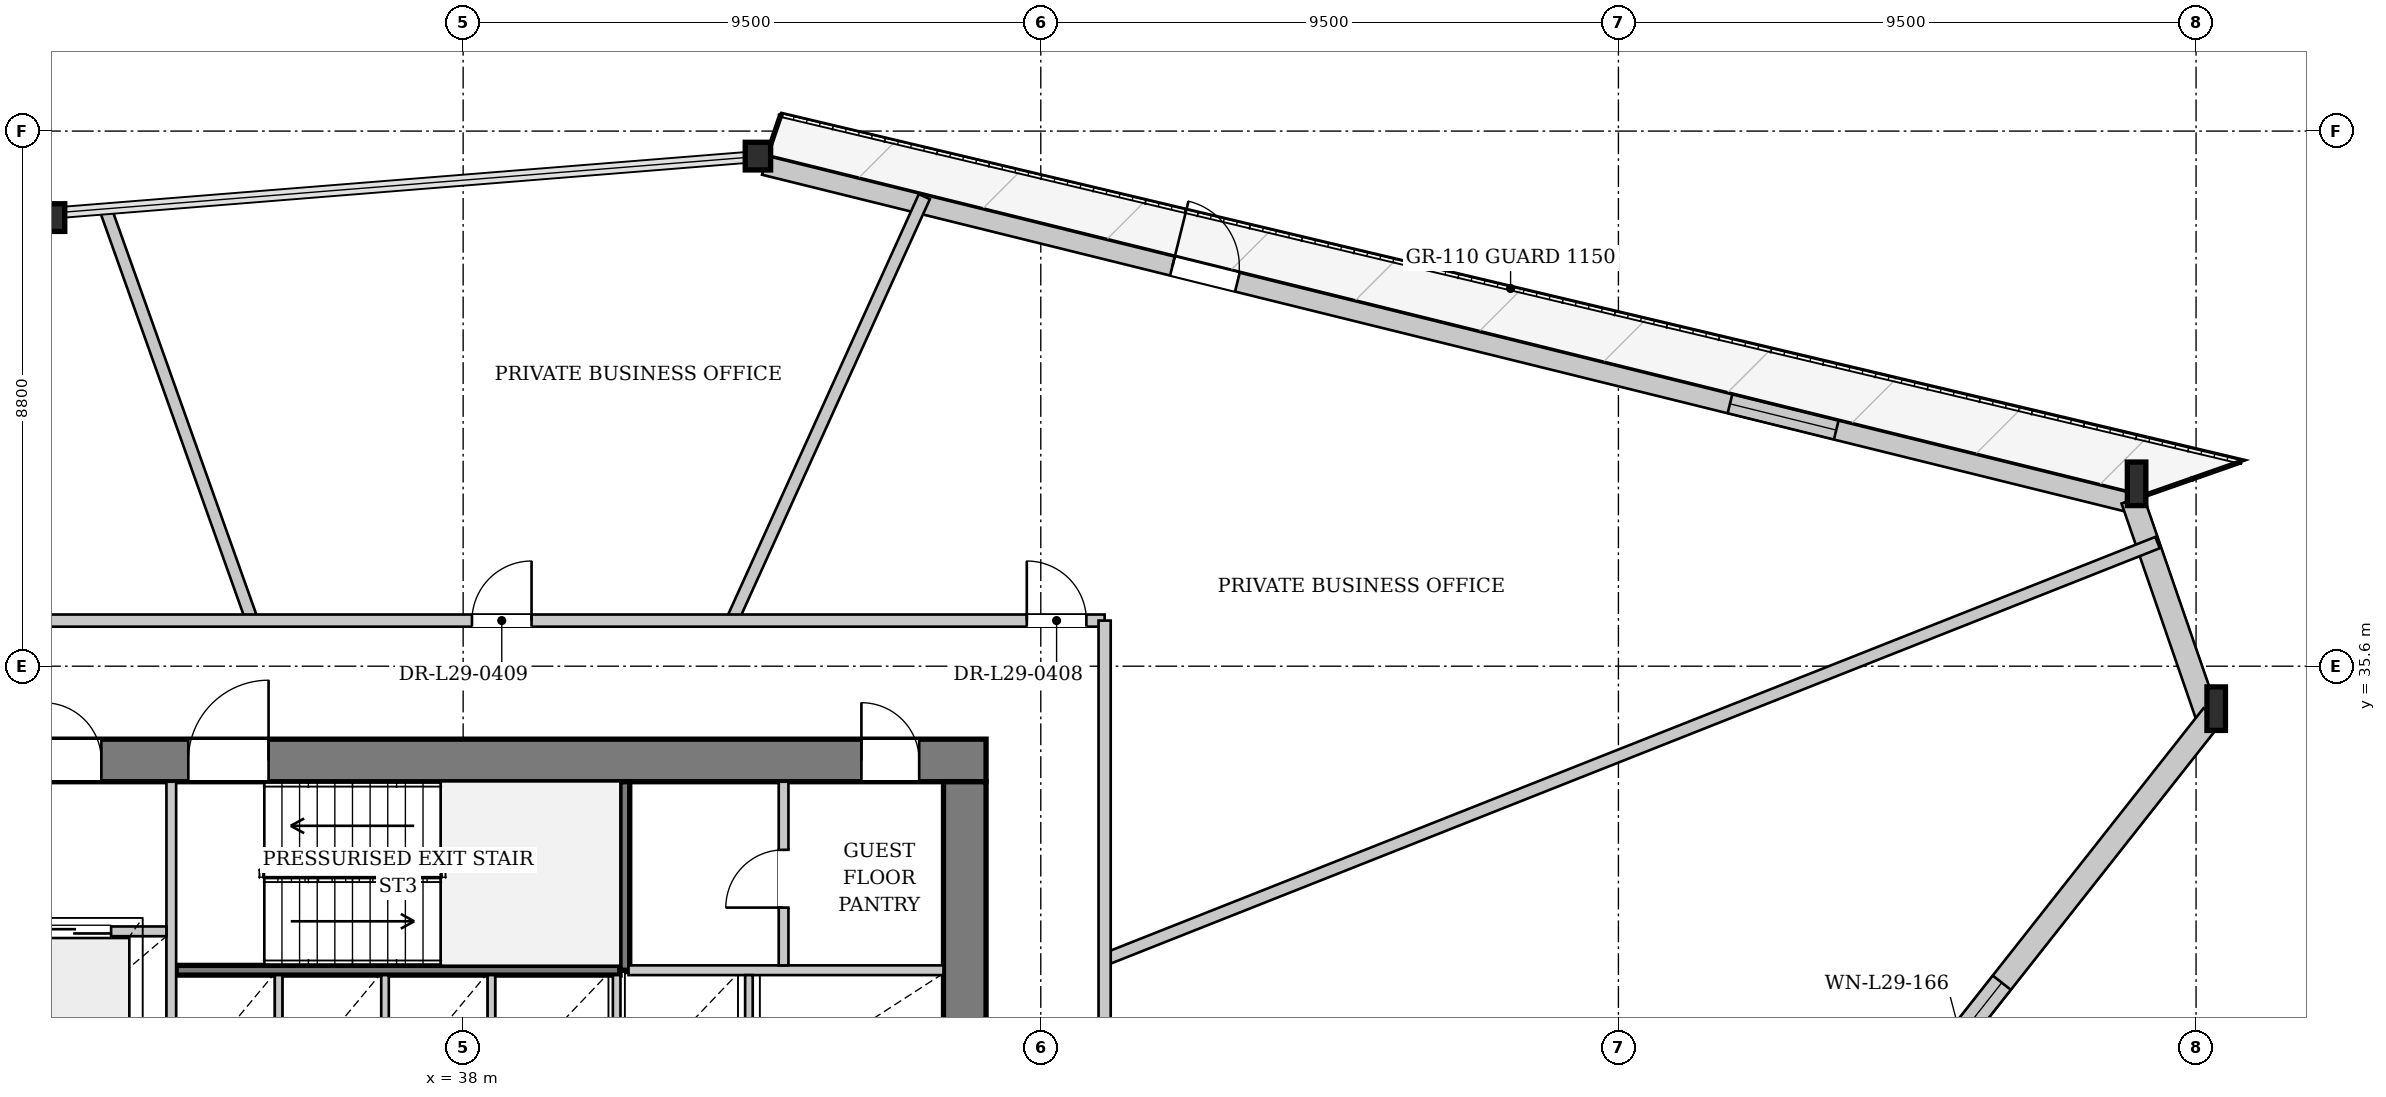
"""IFC4 building model, lengths in metres.
Left out: names, types, materials, properties, quantities, classifications, styles, units other than length and angle.
Written with IfcOpenShell. Run it as: python <this file> out.ifc"""

import sys

from ifc_helpers import new_model, si_unit, direction, frame, frame_2d, origin, origin_2d, place, context, subcontext, project, spatial, rectangle, i_section, extrude, source, transform, mapped, element, fill, save


model = new_model("IFC4")
c1 = context("Model", 3, precision=1e-05, world=origin(), true_north=direction((0.0, 1.0)))
c2 = subcontext(c1, "Body", "Model", "MODEL_VIEW")
j1 = project(units=[si_unit("LENGTHUNIT", "METRE"), si_unit("PLANEANGLEUNIT", "RADIAN")], contexts=[c1])
p1 = place(None, origin())
s1 = spatial("IfcSite", under=j1, at=p1, CompositionType="ELEMENT")
p2 = place(p1, origin())
s2 = spatial("IfcBuilding", under=s1, at=p2, CompositionType="ELEMENT")
p3 = place(p2, frame((0.0, 0.0, 112.8)))
s3 = spatial("IfcBuildingStorey", under=s2, at=p3, CompositionType="ELEMENT", Elevation=112.8)
m1 = source(origin(), c2, "Body", "SweptSolid", [
    extrude(i_section(OverallWidth=0.304, OverallDepth=0.716, WebThickness=0.021, FlangeThickness=0.04, at=origin_2d()), origin(), (0.0, 0.0, 1.0), 3.42),
])
p4 = place(p3, frame((66.92, 34.674, 0.0), z_axis=(-0.052108729922, 0.133269861321, 0.989708959406), x_axis=(-0.931338427179, -0.364154821553, 0.0)))
e1 = element("IfcColumn", 1, at=p4, inside=s3, PredefinedType="COLUMN", context=c2, shape_type="MappedRepresentation", body=[
    mapped(m1, transform((0.0, 0.0, 0.0), x_axis=(1.0, 0.0, 0.0), y_axis=(0.0, 1.0, 0.0), z_axis=(0.0, 0.0, 1.0), scale=1.0)),
])
m2 = source(origin(), c2, "Body", "SweptSolid", [
    extrude(i_section(OverallWidth=0.304, OverallDepth=0.716, WebThickness=0.021, FlangeThickness=0.04, at=origin_2d()), origin(), (0.0, 0.0, 1.0), 3.416),
])
p5 = place(p3, frame((65.634, 38.4, 0.0), z_axis=(-0.065470800854, 0.116789616371, 0.990996346988), x_axis=(-0.872287452748, -0.488993455763, 0.0)))
e2 = element("IfcColumn", 2, at=p5, inside=s3, PredefinedType="COLUMN", context=c2, shape_type="MappedRepresentation", body=[
    mapped(m2, transform((0.0, 0.0, 0.0), x_axis=(1.0, 0.0, 0.0), y_axis=(0.0, 1.0, 0.0), z_axis=(0.0, 0.0, 1.0), scale=1.0)),
])
m3 = source(origin(), c2, "Body", "SweptSolid", [
    extrude(i_section(OverallWidth=0.418, OverallDepth=0.455, WebThickness=0.038, FlangeThickness=0.059, at=origin_2d()), origin(), (0.0, 0.0, 1.0), 3.397),
])
p6 = place(p3, frame((42.992, 43.993, 0.0), z_axis=(-0.084942222493, -0.002658935899, 0.996382330683), x_axis=(0.031287551366, -0.999510424723, 0.0)))
e3 = element("IfcColumn", 3, at=p6, inside=s3, PredefinedType="COLUMN", context=c2, shape_type="MappedRepresentation", body=[
    mapped(m3, transform((0.0, 0.0, 0.0), x_axis=(1.0, 0.0, 0.0), y_axis=(0.0, 1.0, 0.0), z_axis=(0.0, 0.0, 1.0), scale=1.0)),
])
m4 = source(origin(), c2, "Body", "SweptSolid", [
    extrude(i_section(OverallWidth=0.418, OverallDepth=0.455, WebThickness=0.038, FlangeThickness=0.059, at=origin_2d()), origin(), (0.0, 0.0, 1.0), 3.399),
])
p7 = place(p3, frame((31.369, 43.061, 0.0), z_axis=(-0.076208404136, -0.049129640367, 0.995880794863), x_axis=(0.541838144315, -0.840482852511, 0.0)))
e4 = element("IfcColumn", 4, at=p7, inside=s3, PredefinedType="COLUMN", context=c2, shape_type="MappedRepresentation", body=[
    mapped(m4, transform((0.0, 0.0, 0.0), x_axis=(1.0, 0.0, 0.0), y_axis=(0.0, 1.0, 0.0), z_axis=(0.0, 0.0, 1.0), scale=1.0)),
])
p8 = place(p3, frame((42.954, 43.838, 0.0), z_axis=(0.0, 0.0, 1.0), x_axis=(0.970815465414, -0.239827713396, 0.0)))
e5 = element("IfcWall", 5, at=p8, inside=s3, PredefinedType="SOLIDWALL", context=c2, shape_type="SweptSolid", body=[
    extrude(rectangle(XDim=23.322, YDim=0.32, at=frame_2d((11.661, 0.0))), origin(), (0.0, 0.0, 1.0), 2.692),
])
p9 = place(p8, frame((6.913, 0.0, 0.0)))
e6 = element("IfcOpeningElement", 6, at=p9, cuts=e5, PredefinedType="OPENING", context=c2, shape_type="SweptSolid", body=[
    extrude(rectangle(XDim=1.1, YDim=2.3, at=frame_2d((0.55, 1.15))), frame((0.0, 0.17, 0.0), z_axis=(0.0, -1.0, 0.0), x_axis=(1.0, 0.0, 0.0)), (0.0, 0.0, 1.0), 0.34),
])
p10 = place(p8, frame((16.358, 0.0, 0.372)))
e7 = element("IfcOpeningElement", 7, at=p10, cuts=e5, PredefinedType="OPENING", context=c2, shape_type="SweptSolid", body=[
    extrude(rectangle(XDim=1.8, YDim=2.2, at=frame_2d((0.9, 1.1))), frame((0.0, 0.17, 0.0), z_axis=(0.0, -1.0, 0.0), x_axis=(1.0, 0.0, 0.0)), (0.0, 0.0, 1.0), 0.34),
])
p11 = place(p3, frame((65.454, 38.338, 0.0), z_axis=(0.0, 0.0, 1.0), x_axis=(0.32644681429, -0.945215571941, 0.0)))
e8 = element("IfcWall", 8, at=p11, inside=s3, PredefinedType="SOLIDWALL", context=c2, shape_type="SweptSolid", body=[
    extrude(rectangle(XDim=3.942, YDim=0.38, at=frame_2d((1.971, 0.0))), origin(), (0.0, 0.0, 1.0), 2.692),
])
p12 = place(p3, frame((66.771, 34.791, 0.0), z_axis=(0.0, 0.0, 1.0), x_axis=(-0.619144125254, -0.785277372757, 0.0)))
e9 = element("IfcWall", 9, at=p12, inside=s3, PredefinedType="SOLIDWALL", context=c2, shape_type="SweptSolid", body=[
    extrude(rectangle(XDim=23.92, YDim=0.38, at=frame_2d((11.96, 0.0))), origin(), (0.0, 0.0, 1.0), 2.692),
])
p13 = place(p12, frame((5.598, 0.0, 0.322)))
e10 = element("IfcOpeningElement", 10, at=p13, cuts=e9, PredefinedType="OPENING", context=c2, shape_type="SweptSolid", body=[
    extrude(rectangle(XDim=2.2, YDim=2.25, at=frame_2d((1.1, 1.125))), frame((0.0, 0.2, 0.0), z_axis=(0.0, -1.0, 0.0), x_axis=(1.0, 0.0, 0.0)), (0.0, 0.0, 1.0), 0.4),
])
p14 = place(p12, frame((16.122, 0.0, 0.322)))
e11 = element("IfcOpeningElement", 11, at=p14, cuts=e9, PredefinedType="OPENING", context=c2, shape_type="SweptSolid", body=[
    extrude(rectangle(XDim=2.2, YDim=2.25, at=frame_2d((1.1, 1.125))), frame((0.0, 0.2, 0.0), z_axis=(0.0, -1.0, 0.0), x_axis=(1.0, 0.0, 0.0)), (0.0, 0.0, 1.0), 0.4),
])
p15 = place(p3, frame((29.4, 34.05, 0.0), z_axis=(0.0, 0.0, 1.0), x_axis=(1.0, 0.0, 0.0)))
e12 = element("IfcWall", 12, at=p15, inside=s3, PredefinedType="SHEAR", context=c2, shape_type="SweptSolid", body=[
    extrude(rectangle(XDim=17.2, YDim=0.7, at=frame_2d((8.6, 0.0))), origin(), (0.0, 0.0, 1.0), 3.3),
])
p16 = place(p15, frame((1.7, 0.0, 0.0)))
e13 = element("IfcOpeningElement", 13, at=p16, cuts=e12, PredefinedType="OPENING", context=c2, shape_type="SweptSolid", body=[
    extrude(rectangle(XDim=0.95, YDim=2.1, at=frame_2d((0.475, 1.05))), frame((0.0, 0.36, 0.0), z_axis=(0.0, -1.0, 0.0), x_axis=(1.0, 0.0, 0.0)), (0.0, 0.0, 1.0), 0.72),
])
p17 = place(p15, frame((4.08, 0.0, 0.0)))
e14 = element("IfcOpeningElement", 14, at=p17, cuts=e12, PredefinedType="OPENING", context=c2, shape_type="SweptSolid", body=[
    extrude(rectangle(XDim=1.32, YDim=2.2, at=frame_2d((0.66, 1.1))), frame((0.0, 0.36, 0.0), z_axis=(0.0, -1.0, 0.0), x_axis=(1.0, 0.0, 0.0)), (0.0, 0.0, 1.0), 0.72),
])
p18 = place(p15, frame((15.15, 0.0, 0.0)))
e15 = element("IfcOpeningElement", 15, at=p18, cuts=e12, PredefinedType="OPENING", context=c2, shape_type="SweptSolid", body=[
    extrude(rectangle(XDim=0.95, YDim=2.1, at=frame_2d((0.475, 1.05))), frame((0.0, 0.36, 0.0), z_axis=(0.0, -1.0, 0.0), x_axis=(1.0, 0.0, 0.0)), (0.0, 0.0, 1.0), 0.72),
])
p19 = place(p3, frame((46.25, 33.7, 0.0), z_axis=(0.0, 0.0, 1.0), x_axis=(0.0, -1.0, 0.0)))
e16 = element("IfcWall", 16, at=p19, inside=s3, PredefinedType="SHEAR", context=c2, shape_type="SweptSolid", body=[
    extrude(rectangle(XDim=14.2, YDim=0.7, at=frame_2d((7.1, 0.0))), origin(), (0.0, 0.0, 1.0), 3.3),
])
p20 = place(p19, frame((5.18, 0.0, 0.0)))
e17 = element("IfcOpeningElement", 17, at=p20, cuts=e16, PredefinedType="OPENING", context=c2, shape_type="SweptSolid", body=[
    extrude(rectangle(XDim=1.6, YDim=2.2, at=frame_2d((0.8, 1.1))), frame((0.0, 0.36, 0.0), z_axis=(0.0, -1.0, 0.0), x_axis=(1.0, 0.0, 0.0)), (0.0, 0.0, 1.0), 0.72),
])
p21 = place(p3, frame((33.28, 30.6, 0.0), z_axis=(0.0, 0.0, 1.0), x_axis=(1.0, 0.0, 0.0)))
e18 = element("IfcWall", 18, at=p21, inside=s3, PredefinedType="PARTITIONING", context=c2, shape_type="SweptSolid", body=[
    extrude(rectangle(XDim=7.3, YDim=0.16, at=frame_2d((3.65, 0.0))), origin(), (0.0, 0.0, 1.0), 3.3),
])
p22 = place(p3, frame((40.66, 30.6, 0.0), z_axis=(0.0, 0.0, 1.0), x_axis=(0.0, 1.0, 0.0)))
e19 = element("IfcWall", 19, at=p22, inside=s3, PredefinedType="PARTITIONING", context=c2, shape_type="SweptSolid", body=[
    extrude(rectangle(XDim=3.1, YDim=0.16, at=frame_2d((1.55, 0.0))), origin(), (0.0, 0.0, 1.0), 3.3),
])
p23 = place(p3, frame((33.2, 28.44, 0.0), z_axis=(0.0, 0.0, 1.0), x_axis=(0.0, 1.0, 0.0)))
e20 = element("IfcWall", 20, at=p23, inside=s3, PredefinedType="PARTITIONING", context=c2, shape_type="SweptSolid", body=[
    extrude(rectangle(XDim=5.26, YDim=0.16, at=frame_2d((2.63, 0.0))), origin(), (0.0, 0.0, 1.0), 3.3),
])
p24 = place(p3, frame((30.1, 31.24, 0.0), z_axis=(0.0, 0.0, 1.0), x_axis=(1.0, 0.0, 0.0)))
e21 = element("IfcWall", 21, at=p24, inside=s3, PredefinedType="PARTITIONING", context=c2, shape_type="SweptSolid", body=[
    extrude(rectangle(XDim=3.02, YDim=0.16, at=frame_2d((1.51, 0.0))), origin(), (0.0, 0.0, 1.0), 3.3),
])
p25 = place(p24, frame((0.91, 0.0, 0.0)))
e22 = element("IfcOpeningElement", 22, at=p25, cuts=e21, PredefinedType="OPENING", context=c2, shape_type="SweptSolid", body=[
    extrude(rectangle(XDim=1.2, YDim=2.2, at=frame_2d((0.6, 1.1))), frame((0.0, 0.09, 0.0), z_axis=(0.0, -1.0, 0.0), x_axis=(1.0, 0.0, 0.0)), (0.0, 0.0, 1.0), 0.18),
])
p26 = place(p3, frame((40.72, 30.6, 0.0), z_axis=(0.0, 0.0, 1.0), x_axis=(1.0, 0.0, 0.0)))
e23 = element("IfcWall", 23, at=p26, inside=s3, PredefinedType="PARTITIONING", context=c2, shape_type="SweptSolid", body=[
    extrude(rectangle(XDim=5.18, YDim=0.16, at=frame_2d((2.59, 0.0))), origin(), (0.0, 0.0, 1.0), 3.3),
])
for number, where, z_axis, x_axis in (
    (24, (34.965, 28.6, 0.0), (0.0, 0.0, 1.0), (0.0, 1.0, 0.0)),
    (25, (36.715, 28.6, 0.0), (0.0, 0.0, 1.0), (0.0, 1.0, 0.0)),
    (26, (38.465, 28.6, 0.0), (0.0, 0.0, 1.0), (0.0, 1.0, 0.0)),
    (27, (40.525, 28.6, 0.0), (0.0, 0.0, 1.0), (0.0, 1.0, 0.0)),
    (28, (42.7, 28.6, 0.0), (0.0, 0.0, 1.0), (0.0, 1.0, 0.0)),
):
    element("IfcWall", number, at=place(p3, frame(where, z_axis=z_axis, x_axis=x_axis)), inside=s3, PredefinedType="PARTITIONING", context=c2, shape_type="SweptSolid", body=[
        extrude(rectangle(XDim=1.92, YDim=0.125, at=frame_2d((0.96, 0.0))), origin(), (0.0, 0.0, 1.0), 3.3),
    ])
p27 = place(p3, frame((43.27, 30.68, 0.0), z_axis=(0.0, 0.0, 1.0), x_axis=(0.0, 1.0, 0.0)))
e29 = element("IfcWall", 29, at=p27, inside=s3, PredefinedType="PARTITIONING", context=c2, shape_type="SweptSolid", body=[
    extrude(rectangle(XDim=3.02, YDim=0.16, at=frame_2d((1.51, 0.0))), origin(), (0.0, 0.0, 1.0), 3.3),
])
p28 = place(p27, frame((0.95, 0.0, 0.0)))
e30 = element("IfcOpeningElement", 30, at=p28, cuts=e29, PredefinedType="OPENING", context=c2, shape_type="SweptSolid", body=[
    extrude(rectangle(XDim=0.95, YDim=2.1, at=frame_2d((0.475, 1.05))), frame((0.0, 0.09, 0.0), z_axis=(0.0, -1.0, 0.0), x_axis=(1.0, 0.0, 0.0)), (0.0, 0.0, 1.0), 0.18),
])
p29 = place(p3, frame((48.55, 30.777, 0.0), z_axis=(0.0, 0.0, 1.0), x_axis=(0.929775488652, 0.368127071407, 0.0)))
e31 = element("IfcWall", 31, at=p29, inside=s3, PredefinedType="PARTITIONING", context=c2, shape_type="SweptSolid", body=[
    extrude(rectangle(XDim=18.625, YDim=0.2, at=frame_2d((9.312, 0.0))), origin(), (0.0, 0.0, 1.0), 3.3),
])
p30 = place(p3, frame((42.423, 36.35, 0.0), z_axis=(0.0, 0.0, 1.0), x_axis=(0.413101190414, 0.910685130261, 0.0)))
e32 = element("IfcWall", 32, at=p30, inside=s3, PredefinedType="PARTITIONING", context=c2, shape_type="SweptSolid", body=[
    extrude(rectangle(XDim=7.655, YDim=0.2, at=frame_2d((3.828, 0.0))), origin(), (0.0, 0.0, 1.0), 3.3),
])
p31 = place(p3, frame((34.528, 36.35, 0.0), z_axis=(0.0, 0.0, 1.0), x_axis=(-0.335484779228, 0.942045626765, 0.0)))
e33 = element("IfcWall", 33, at=p31, inside=s3, PredefinedType="PARTITIONING", context=c2, shape_type="SweptSolid", body=[
    extrude(rectangle(XDim=7.156, YDim=0.2, at=frame_2d((3.578, 0.0))), origin(), (0.0, 0.0, 1.0), 3.3),
])
p32 = place(p3, frame((27.45, 36.35, 0.0), z_axis=(0.0, 0.0, 1.0), x_axis=(1.0, 0.0, 0.0)))
e34 = element("IfcWall", 34, at=p32, inside=s3, PredefinedType="PARTITIONING", context=c2, shape_type="SweptSolid", body=[
    extrude(rectangle(XDim=21.1, YDim=0.2, at=frame_2d((10.55, 0.0))), origin(), (0.0, 0.0, 1.0), 3.3),
])
p33 = place(p32, frame((19.82, 0.0, 0.0)))
e35 = element("IfcOpeningElement", 35, at=p33, cuts=e34, PredefinedType="OPENING", context=c2, shape_type="SweptSolid", body=[
    extrude(rectangle(XDim=0.98, YDim=2.15, at=frame_2d((0.49, 1.075))), frame((0.0, 0.11, 0.0), z_axis=(0.0, -1.0, 0.0), x_axis=(1.0, 0.0, 0.0)), (0.0, 0.0, 1.0), 0.22),
])
p34 = place(p32, frame((10.695, 0.0, 0.0)))
e36 = element("IfcOpeningElement", 36, at=p34, cuts=e34, PredefinedType="OPENING", context=c2, shape_type="SweptSolid", body=[
    extrude(rectangle(XDim=0.98, YDim=2.15, at=frame_2d((0.49, 1.075))), frame((0.0, 0.11, 0.0), z_axis=(0.0, -1.0, 0.0), x_axis=(1.0, 0.0, 0.0)), (0.0, 0.0, 1.0), 0.22),
])
p35 = place(p3, frame((48.55, 16.85, 0.0), z_axis=(0.0, 0.0, 1.0), x_axis=(0.0, 1.0, 0.0)))
e37 = element("IfcWall", 37, at=p35, inside=s3, PredefinedType="PARTITIONING", context=c2, shape_type="SweptSolid", body=[
    extrude(rectangle(XDim=19.5, YDim=0.2, at=frame_2d((9.75, 0.0))), origin(), (0.0, 0.0, 1.0), 3.3),
])
p36 = place(p35, frame((9.174, 0.0, 0.0)))
e38 = element("IfcOpeningElement", 38, at=p36, cuts=e37, PredefinedType="OPENING", context=c2, shape_type="SweptSolid", body=[
    extrude(rectangle(XDim=0.98, YDim=2.15, at=frame_2d((0.49, 1.075))), frame((0.0, 0.11, 0.0), z_axis=(0.0, -1.0, 0.0), x_axis=(1.0, 0.0, 0.0)), (0.0, 0.0, 1.0), 0.22),
])
m5 = source(origin(), c2, "Body", "SweptSolid", [
    extrude(rectangle(XDim=1.1, YDim=2.3, at=frame_2d((0.55, 1.15))), frame((0.0, 0.025, 0.0), z_axis=(0.0, -1.0, 0.0), x_axis=(1.0, 0.0, 0.0)), (0.0, 0.0, 1.0), 0.05),
])
p37 = place(p9, origin())
e39 = element("IfcDoor", 39, at=p37, inside=s3, OperationType="SINGLE_SWING_LEFT", PredefinedType="DOOR", context=c2, shape_type="MappedRepresentation", body=[
    mapped(m5, transform((0.0, 0.0, 0.0), x_axis=(1.0, 0.0, 0.0), y_axis=(0.0, 1.0, 0.0), z_axis=(0.0, 0.0, 1.0), scale=1.0)),
])
fill(e6, e39)
m6 = source(origin(), c2, "Body", "SweptSolid", [
    extrude(rectangle(XDim=1.8, YDim=2.2, at=frame_2d((0.9, 1.1))), frame((0.0, 0.03, 0.0), z_axis=(0.0, -1.0, 0.0), x_axis=(1.0, 0.0, 0.0)), (0.0, 0.0, 1.0), 0.06),
])
p38 = place(p10, origin())
e40 = element("IfcWindow", 40, at=p38, inside=s3, PartitioningType="SINGLE_PANEL", PredefinedType="WINDOW", context=c2, shape_type="MappedRepresentation", body=[
    mapped(m6, transform((0.0, 0.0, 0.0), x_axis=(1.0, 0.0, 0.0), y_axis=(0.0, 1.0, 0.0), z_axis=(0.0, 0.0, 1.0), scale=1.0)),
])
fill(e7, e40)
m7 = source(origin(), c2, "Body", "SweptSolid", [
    extrude(rectangle(XDim=2.2, YDim=2.25, at=frame_2d((1.1, 1.125))), frame((0.0, 0.03, 0.0), z_axis=(0.0, -1.0, 0.0), x_axis=(1.0, 0.0, 0.0)), (0.0, 0.0, 1.0), 0.06),
])
p39 = place(p13, origin())
e41 = element("IfcWindow", 41, at=p39, inside=s3, PartitioningType="SINGLE_PANEL", PredefinedType="WINDOW", context=c2, shape_type="MappedRepresentation", body=[
    mapped(m7, transform((0.0, 0.0, 0.0), x_axis=(1.0, 0.0, 0.0), y_axis=(0.0, 1.0, 0.0), z_axis=(0.0, 0.0, 1.0), scale=1.0)),
])
fill(e10, e41)
m8 = source(origin(), c2, "Body", "SweptSolid", [
    extrude(rectangle(XDim=0.95, YDim=2.1, at=frame_2d((0.475, 1.05))), frame((0.0, 0.025, 0.0), z_axis=(0.0, -1.0, 0.0), x_axis=(1.0, 0.0, 0.0)), (0.0, 0.0, 1.0), 0.05),
])
p40 = place(p16, origin())
e42 = element("IfcDoor", 42, at=p40, inside=s3, OperationType="SINGLE_SWING_LEFT", PredefinedType="DOOR", context=c2, shape_type="MappedRepresentation", body=[
    mapped(m8, transform((0.0, 0.0, 0.0), x_axis=(1.0, 0.0, 0.0), y_axis=(0.0, 1.0, 0.0), z_axis=(0.0, 0.0, 1.0), scale=1.0)),
])
fill(e13, e42)
m9 = source(origin(), c2, "Body", "SweptSolid", [
    extrude(rectangle(XDim=1.32, YDim=2.2, at=frame_2d((0.66, 1.1))), frame((0.0, 0.025, 0.0), z_axis=(0.0, -1.0, 0.0), x_axis=(1.0, 0.0, 0.0)), (0.0, 0.0, 1.0), 0.05),
])
p41 = place(p17, origin())
e43 = element("IfcDoor", 43, at=p41, inside=s3, OperationType="SINGLE_SWING_RIGHT", PredefinedType="DOOR", context=c2, shape_type="MappedRepresentation", body=[
    mapped(m9, transform((0.0, 0.0, 0.0), x_axis=(1.0, 0.0, 0.0), y_axis=(0.0, 1.0, 0.0), z_axis=(0.0, 0.0, 1.0), scale=1.0)),
])
fill(e14, e43)
m10 = source(origin(), c2, "Body", "SweptSolid", [
    extrude(rectangle(XDim=1.2, YDim=2.2, at=frame_2d((0.6, 1.1))), frame((0.0, 0.025, 0.0), z_axis=(0.0, -1.0, 0.0), x_axis=(1.0, 0.0, 0.0)), (0.0, 0.0, 1.0), 0.05),
])
p42 = place(p25, origin())
e44 = element("IfcDoor", 44, at=p42, inside=s3, OperationType="DOUBLE_DOOR_SLIDING", PredefinedType="DOOR", context=c2, shape_type="MappedRepresentation", body=[
    mapped(m10, transform((0.0, 0.0, 0.0), x_axis=(1.0, 0.0, 0.0), y_axis=(0.0, 1.0, 0.0), z_axis=(0.0, 0.0, 1.0), scale=1.0)),
])
fill(e22, e44)
p43 = place(p28, origin())
e45 = element("IfcDoor", 45, at=p43, inside=s3, OperationType="SINGLE_SWING_LEFT", PredefinedType="DOOR", context=c2, shape_type="MappedRepresentation", body=[
    mapped(m8, transform((0.0, 0.0, 0.0), x_axis=(1.0, 0.0, 0.0), y_axis=(0.0, 1.0, 0.0), z_axis=(0.0, 0.0, 1.0), scale=1.0)),
])
fill(e30, e45)
p44 = place(p18, origin())
e46 = element("IfcDoor", 46, at=p44, inside=s3, OperationType="SINGLE_SWING_LEFT", PredefinedType="DOOR", context=c2, shape_type="MappedRepresentation", body=[
    mapped(m8, transform((0.0, 0.0, 0.0), x_axis=(1.0, 0.0, 0.0), y_axis=(0.0, 1.0, 0.0), z_axis=(0.0, 0.0, 1.0), scale=1.0)),
])
fill(e15, e46)
m11 = source(origin(), c2, "Body", "SweptSolid", [
    extrude(rectangle(XDim=0.98, YDim=2.15, at=frame_2d((0.49, 1.075))), frame((0.0, 0.025, 0.0), z_axis=(0.0, -1.0, 0.0), x_axis=(1.0, 0.0, 0.0)), (0.0, 0.0, 1.0), 0.05),
])
p45 = place(p33, origin())
e47 = element("IfcDoor", 47, at=p45, inside=s3, OperationType="SINGLE_SWING_LEFT", PredefinedType="DOOR", context=c2, shape_type="MappedRepresentation", body=[
    mapped(m11, transform((0.0, 0.0, 0.0), x_axis=(1.0, 0.0, 0.0), y_axis=(0.0, 1.0, 0.0), z_axis=(0.0, 0.0, 1.0), scale=1.0)),
])
fill(e35, e47)
p46 = place(p34, origin())
e48 = element("IfcDoor", 48, at=p46, inside=s3, OperationType="SINGLE_SWING_RIGHT", PredefinedType="DOOR", context=c2, shape_type="MappedRepresentation", body=[
    mapped(m11, transform((0.0, 0.0, 0.0), x_axis=(1.0, 0.0, 0.0), y_axis=(0.0, 1.0, 0.0), z_axis=(0.0, 0.0, 1.0), scale=1.0)),
])
fill(e36, e48)
save(model, sys.argv[1])
